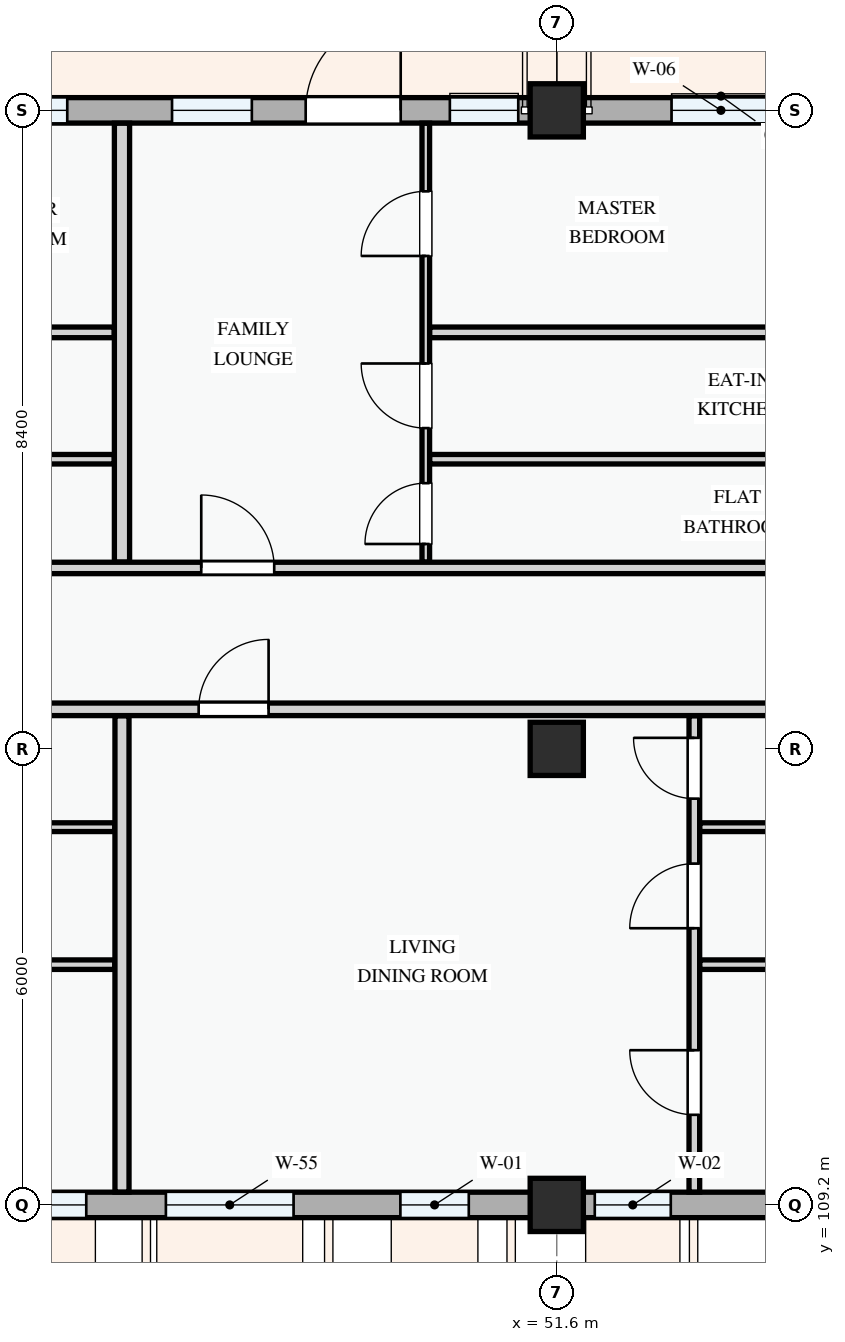
"""IFC4 building model, lengths in metres.
Left out: names, types, materials, properties, quantities, classifications, styles, units other than length and angle.
Written with IfcOpenShell. Run it as: python <this file> out.ifc"""

import sys

from ifc_helpers import new_model, si_unit, direction, frame, frame_2d, origin, origin_2d, place, context, subcontext, project, spatial, rectangle, extrude, element, fill, save


model = new_model("IFC4")
c1 = context("Model", 3, precision=1e-05, world=origin(), true_north=direction((0.0, 1.0)))
c2 = subcontext(c1, "Body", "Model", "MODEL_VIEW")
j1 = project(units=[si_unit("LENGTHUNIT", "METRE"), si_unit("PLANEANGLEUNIT", "RADIAN")], contexts=[c1])
p1 = place(None, origin())
s1 = spatial("IfcSite", under=j1, at=p1, CompositionType="ELEMENT")
p2 = place(p1, origin())
s2 = spatial("IfcBuilding", under=s1, at=p2, CompositionType="ELEMENT")
p3 = place(p2, frame((0.0, 0.0, 18.0)))
s3 = spatial("IfcBuildingStorey", under=s2, at=p3, CompositionType="ELEMENT", Elevation=18.0)
for number, where, z_axis, x_axis in (
    (1, (51.6, 109.2, 0.0), (0.0, 0.0, 1.0), (1.0, 0.0, 0.0)),
    (2, (51.6, 115.2, 0.0), (0.0, 0.0, 1.0), (1.0, 0.0, 0.0)),
    (3, (51.6, 123.6, 0.0), (0.0, 0.0, 1.0), (1.0, 0.0, 0.0)),
):
    element("IfcColumn", number, at=place(p3, frame(where, z_axis=z_axis, x_axis=x_axis)), inside=s3, PredefinedType="COLUMN", context=c2, shape_type="SweptSolid", body=[
        extrude(rectangle(XDim=0.7, YDim=0.7, at=origin_2d()), origin(), (0.0, 0.0, 1.0), 3.3),
    ])
p4 = place(p3, frame((43.2, 109.2, 0.0), z_axis=(0.0, 0.0, 1.0), x_axis=(1.0, 0.0, 0.0)))
e4 = element("IfcWall", 4, at=p4, inside=s3, PredefinedType="STANDARD", context=c2, shape_type="SweptSolid", body=[
    extrude(rectangle(XDim=8.4, YDim=0.335, at=frame_2d((4.2, 0.0))), origin(), (0.0, 0.0, 1.0), 2.375),
])
p5 = place(p4, frame((0.66, 0.0, 0.78)))
e5 = element("IfcOpeningElement", 5, at=p5, cuts=e4, PredefinedType="OPENING", context=c2, shape_type="SweptSolid", body=[
    extrude(rectangle(XDim=1.55, YDim=1.4, at=frame_2d((0.775, 0.7))), frame((0.0, 0.177, 0.0), z_axis=(0.0, -1.0, 0.0), x_axis=(1.0, 0.0, 0.0)), (0.0, 0.0, 1.0), 0.355),
])
p6 = place(p4, frame((3.258, 0.0, 0.78)))
e6 = element("IfcOpeningElement", 6, at=p6, cuts=e4, PredefinedType="OPENING", context=c2, shape_type="SweptSolid", body=[
    extrude(rectangle(XDim=1.68, YDim=1.46, at=frame_2d((0.84, 0.73))), frame((0.0, 0.177, 0.0), z_axis=(0.0, -1.0, 0.0), x_axis=(1.0, 0.0, 0.0)), (0.0, 0.0, 1.0), 0.355),
])
p7 = place(p4, frame((6.343, 0.0, 0.78)))
e7 = element("IfcOpeningElement", 7, at=p7, cuts=e4, PredefinedType="OPENING", context=c2, shape_type="SweptSolid", body=[
    extrude(rectangle(XDim=0.9, YDim=1.2, at=frame_2d((0.45, 0.6))), frame((0.0, 0.177, 0.0), z_axis=(0.0, -1.0, 0.0), x_axis=(1.0, 0.0, 0.0)), (0.0, 0.0, 1.0), 0.355),
])
p8 = place(p3, frame((51.6, 109.2, 0.0), z_axis=(0.0, 0.0, 1.0), x_axis=(1.0, 0.0, 0.0)))
e8 = element("IfcWall", 8, at=p8, inside=s3, PredefinedType="STANDARD", context=c2, shape_type="SweptSolid", body=[
    extrude(rectangle(XDim=6.0, YDim=0.335, at=frame_2d((3.0, 0.0))), origin(), (0.0, 0.0, 1.0), 2.475),
])
p9 = place(p8, frame((0.5, 0.0, 0.78)))
e9 = element("IfcOpeningElement", 9, at=p9, cuts=e8, PredefinedType="OPENING", context=c2, shape_type="SweptSolid", body=[
    extrude(rectangle(XDim=1.0, YDim=1.25, at=frame_2d((0.5, 0.625))), frame((0.0, 0.177, 0.0), z_axis=(0.0, -1.0, 0.0), x_axis=(1.0, 0.0, 0.0)), (0.0, 0.0, 1.0), 0.355),
])
p10 = place(p8, frame((3.36, 0.0, 0.78)))
e10 = element("IfcOpeningElement", 10, at=p10, cuts=e8, PredefinedType="OPENING", context=c2, shape_type="SweptSolid", body=[
    extrude(rectangle(XDim=0.9, YDim=1.2, at=frame_2d((0.45, 0.6))), frame((0.0, 0.177, 0.0), z_axis=(0.0, -1.0, 0.0), x_axis=(1.0, 0.0, 0.0)), (0.0, 0.0, 1.0), 0.355),
])
p11 = place(p3, frame((57.6, 123.6, 0.0), z_axis=(0.0, 0.0, 1.0), x_axis=(-1.0, 0.0, 0.0)))
e11 = element("IfcWall", 11, at=p11, inside=s3, PredefinedType="STANDARD", context=c2, shape_type="SweptSolid", body=[
    extrude(rectangle(XDim=6.0, YDim=0.335, at=frame_2d((3.0, 0.0))), origin(), (0.0, 0.0, 1.0), 2.475),
])
p12 = place(p11, frame((0.62, 0.0, 0.0)))
e12 = element("IfcOpeningElement", 12, at=p12, cuts=e11, PredefinedType="OPENING", context=c2, shape_type="SweptSolid", body=[
    extrude(rectangle(XDim=1.2, YDim=2.15, at=frame_2d((0.6, 1.075))), frame((0.0, 0.177, 0.0), z_axis=(0.0, -1.0, 0.0), x_axis=(1.0, 0.0, 0.0)), (0.0, 0.0, 1.0), 0.355),
])
p13 = place(p11, frame((3.19, 0.0, 0.78)))
e13 = element("IfcOpeningElement", 13, at=p13, cuts=e11, PredefinedType="OPENING", context=c2, shape_type="SweptSolid", body=[
    extrude(rectangle(XDim=1.3, YDim=1.4, at=frame_2d((0.65, 0.7))), frame((0.0, 0.177, 0.0), z_axis=(0.0, -1.0, 0.0), x_axis=(1.0, 0.0, 0.0)), (0.0, 0.0, 1.0), 0.355),
])
p14 = place(p3, frame((51.6, 123.6, 0.0), z_axis=(0.0, 0.0, 1.0), x_axis=(-1.0, 0.0, 0.0)))
e14 = element("IfcWall", 14, at=p14, inside=s3, PredefinedType="STANDARD", context=c2, shape_type="SweptSolid", body=[
    extrude(rectangle(XDim=8.4, YDim=0.335, at=frame_2d((4.2, 0.0))), origin(), (0.0, 0.0, 1.0), 2.375),
])
p15 = place(p14, frame((2.053, 0.0, 0.0)))
e15 = element("IfcOpeningElement", 15, at=p15, cuts=e14, PredefinedType="OPENING", context=c2, shape_type="SweptSolid", body=[
    extrude(rectangle(XDim=1.25, YDim=2.2, at=frame_2d((0.625, 1.1))), frame((0.0, 0.177, 0.0), z_axis=(0.0, -1.0, 0.0), x_axis=(1.0, 0.0, 0.0)), (0.0, 0.0, 1.0), 0.355),
])
p16 = place(p14, frame((0.507, 0.0, 0.78)))
e16 = element("IfcOpeningElement", 16, at=p16, cuts=e14, PredefinedType="OPENING", context=c2, shape_type="SweptSolid", body=[
    extrude(rectangle(XDim=0.9, YDim=1.2, at=frame_2d((0.45, 0.6))), frame((0.0, 0.177, 0.0), z_axis=(0.0, -1.0, 0.0), x_axis=(1.0, 0.0, 0.0)), (0.0, 0.0, 1.0), 0.355),
])
p17 = place(p14, frame((4.012, 0.0, 0.78)))
e17 = element("IfcOpeningElement", 17, at=p17, cuts=e14, PredefinedType="OPENING", context=c2, shape_type="SweptSolid", body=[
    extrude(rectangle(XDim=1.05, YDim=1.2, at=frame_2d((0.525, 0.6))), frame((0.0, 0.177, 0.0), z_axis=(0.0, -1.0, 0.0), x_axis=(1.0, 0.0, 0.0)), (0.0, 0.0, 1.0), 0.355),
])
p18 = place(p14, frame((6.44, 0.0, 0.78)))
e18 = element("IfcOpeningElement", 18, at=p18, cuts=e14, PredefinedType="OPENING", context=c2, shape_type="SweptSolid", body=[
    extrude(rectangle(XDim=1.05, YDim=1.2, at=frame_2d((0.525, 0.6))), frame((0.0, 0.177, 0.0), z_axis=(0.0, -1.0, 0.0), x_axis=(1.0, 0.0, 0.0)), (0.0, 0.0, 1.0), 0.355),
])
p19 = place(p3, frame((40.447, 112.361, 0.0), z_axis=(0.0, 0.0, 1.0), x_axis=(1.0, 0.0, 0.0)))
e19 = element("IfcWall", 19, at=p19, inside=s3, PredefinedType="PARTITIONING", context=c2, shape_type="SweptSolid", body=[
    extrude(rectangle(XDim=5.338, YDim=0.125, at=frame_2d((2.669, 0.0))), origin(), (0.0, 0.0, 1.0), 3.0),
])
p20 = place(p3, frame((40.447, 114.17, 0.0), z_axis=(0.0, 0.0, 1.0), x_axis=(1.0, 0.0, 0.0)))
e20 = element("IfcWall", 20, at=p20, inside=s3, PredefinedType="PARTITIONING", context=c2, shape_type="SweptSolid", body=[
    extrude(rectangle(XDim=5.338, YDim=0.115, at=frame_2d((2.669, 0.0))), origin(), (0.0, 0.0, 1.0), 3.0),
])
p21 = place(p3, frame((40.207, 120.679, 0.0), z_axis=(0.0, 0.0, 1.0), x_axis=(1.0, 0.0, 0.0)))
e21 = element("IfcWall", 21, at=p21, inside=s3, PredefinedType="PARTITIONING", context=c2, shape_type="SweptSolid", body=[
    extrude(rectangle(XDim=5.571, YDim=0.14, at=frame_2d((2.786, 0.0))), origin(), (0.0, 0.0, 1.0), 3.0),
])
p22 = place(p3, frame((40.207, 119.01, 0.0), z_axis=(0.0, 0.0, 1.0), x_axis=(1.0, 0.0, 0.0)))
e22 = element("IfcWall", 22, at=p22, inside=s3, PredefinedType="PARTITIONING", context=c2, shape_type="SweptSolid", body=[
    extrude(rectangle(XDim=5.571, YDim=0.125, at=frame_2d((2.786, 0.0))), origin(), (0.0, 0.0, 1.0), 3.0),
])
p23 = place(p3, frame((53.41, 109.369, 0.0), z_axis=(0.0, 0.0, 1.0), x_axis=(0.0, 1.0, 0.0)))
e23 = element("IfcWall", 23, at=p23, inside=s3, PredefinedType="PARTITIONING", context=c2, shape_type="SweptSolid", body=[
    extrude(rectangle(XDim=6.266, YDim=0.14, at=frame_2d((3.133, 0.0))), origin(), (0.0, 0.0, 1.0), 3.0),
])
p24 = place(p23, frame((1.016, 0.0, 0.0)))
e24 = element("IfcOpeningElement", 24, at=p24, cuts=e23, PredefinedType="OPENING", context=c2, shape_type="SweptSolid", body=[
    extrude(rectangle(XDim=0.85, YDim=2.1, at=frame_2d((0.425, 1.05))), frame((0.0, 0.08, 0.0), z_axis=(0.0, -1.0, 0.0), x_axis=(1.0, 0.0, 0.0)), (0.0, 0.0, 1.0), 0.16),
])
p25 = place(p23, frame((3.471, 0.0, 0.0)))
e25 = element("IfcOpeningElement", 25, at=p25, cuts=e23, PredefinedType="OPENING", context=c2, shape_type="SweptSolid", body=[
    extrude(rectangle(XDim=0.85, YDim=2.1, at=frame_2d((0.425, 1.05))), frame((0.0, 0.08, 0.0), z_axis=(0.0, -1.0, 0.0), x_axis=(1.0, 0.0, 0.0)), (0.0, 0.0, 1.0), 0.16),
])
p26 = place(p23, frame((5.175, 0.0, 0.0)))
e26 = element("IfcOpeningElement", 26, at=p26, cuts=e23, PredefinedType="OPENING", context=c2, shape_type="SweptSolid", body=[
    extrude(rectangle(XDim=0.8, YDim=2.1, at=frame_2d((0.4, 1.05))), frame((0.0, 0.08, 0.0), z_axis=(0.0, -1.0, 0.0), x_axis=(1.0, 0.0, 0.0)), (0.0, 0.0, 1.0), 0.16),
])
p27 = place(p3, frame((53.482, 112.361, 0.0), z_axis=(0.0, 0.0, 1.0), x_axis=(1.0, 0.0, 0.0)))
e27 = element("IfcWall", 27, at=p27, inside=s3, PredefinedType="PARTITIONING", context=c2, shape_type="SweptSolid", body=[
    extrude(rectangle(XDim=3.948, YDim=0.125, at=frame_2d((1.974, 0.0))), origin(), (0.0, 0.0, 1.0), 3.0),
])
p28 = place(p3, frame((53.482, 114.17, 0.0), z_axis=(0.0, 0.0, 1.0), x_axis=(1.0, 0.0, 0.0)))
e28 = element("IfcWall", 28, at=p28, inside=s3, PredefinedType="PARTITIONING", context=c2, shape_type="SweptSolid", body=[
    extrude(rectangle(XDim=3.948, YDim=0.115, at=frame_2d((1.974, 0.0))), origin(), (0.0, 0.0, 1.0), 3.0),
])
p29 = place(p3, frame((49.877, 117.657, 0.0), z_axis=(0.0, 0.0, 1.0), x_axis=(0.0, 1.0, 0.0)))
e29 = element("IfcWall", 29, at=p29, inside=s3, PredefinedType="PARTITIONING", context=c2, shape_type="SweptSolid", body=[
    extrude(rectangle(XDim=5.773, YDim=0.1, at=frame_2d((2.887, 0.0))), origin(), (0.0, 0.0, 1.0), 3.0),
])
p30 = place(p29, frame((0.238, 0.0, 0.0)))
e30 = element("IfcOpeningElement", 30, at=p30, cuts=e29, PredefinedType="OPENING", context=c2, shape_type="SweptSolid", body=[
    extrude(rectangle(XDim=0.8, YDim=2.1, at=frame_2d((0.4, 1.05))), frame((0.0, 0.06, 0.0), z_axis=(0.0, -1.0, 0.0), x_axis=(1.0, 0.0, 0.0)), (0.0, 0.0, 1.0), 0.12),
])
p31 = place(p29, frame((1.763, 0.0, 0.0)))
e31 = element("IfcOpeningElement", 31, at=p31, cuts=e29, PredefinedType="OPENING", context=c2, shape_type="SweptSolid", body=[
    extrude(rectangle(XDim=0.85, YDim=2.1, at=frame_2d((0.425, 1.05))), frame((0.0, 0.06, 0.0), z_axis=(0.0, -1.0, 0.0), x_axis=(1.0, 0.0, 0.0)), (0.0, 0.0, 1.0), 0.12),
])
p32 = place(p29, frame((4.028, 0.0, 0.0)))
e32 = element("IfcOpeningElement", 32, at=p32, cuts=e29, PredefinedType="OPENING", context=c2, shape_type="SweptSolid", body=[
    extrude(rectangle(XDim=0.85, YDim=2.1, at=frame_2d((0.425, 1.05))), frame((0.0, 0.06, 0.0), z_axis=(0.0, -1.0, 0.0), x_axis=(1.0, 0.0, 0.0)), (0.0, 0.0, 1.0), 0.12),
])
p33 = place(p3, frame((49.929, 120.679, 0.0), z_axis=(0.0, 0.0, 1.0), x_axis=(1.0, 0.0, 0.0)))
e33 = element("IfcWall", 33, at=p33, inside=s3, PredefinedType="PARTITIONING", context=c2, shape_type="SweptSolid", body=[
    extrude(rectangle(XDim=7.611, YDim=0.14, at=frame_2d((3.806, 0.0))), origin(), (0.0, 0.0, 1.0), 3.0),
])
p34 = place(p3, frame((49.929, 119.01, 0.0), z_axis=(0.0, 0.0, 1.0), x_axis=(1.0, 0.0, 0.0)))
e34 = element("IfcWall", 34, at=p34, inside=s3, PredefinedType="PARTITIONING", context=c2, shape_type="SweptSolid", body=[
    extrude(rectangle(XDim=7.611, YDim=0.125, at=frame_2d((3.806, 0.0))), origin(), (0.0, 0.0, 1.0), 3.0),
])
p35 = place(p3, frame((45.88, 109.369, 0.0), z_axis=(0.0, 0.0, 1.0), x_axis=(0.0, 1.0, 0.0)))
e35 = element("IfcWall", 35, at=p35, inside=s3, PredefinedType="PARTITIONING", context=c2, shape_type="SweptSolid", body=[
    extrude(rectangle(XDim=6.266, YDim=0.185, at=frame_2d((3.133, 0.0))), origin(), (0.0, 0.0, 1.0), 3.0),
])
p36 = place(p3, frame((45.88, 117.657, 0.0), z_axis=(0.0, 0.0, 1.0), x_axis=(0.0, 1.0, 0.0)))
e36 = element("IfcWall", 36, at=p36, inside=s3, PredefinedType="PARTITIONING", context=c2, shape_type="SweptSolid", body=[
    extrude(rectangle(XDim=5.773, YDim=0.2, at=frame_2d((2.887, 0.0))), origin(), (0.0, 0.0, 1.0), 3.0),
])
p37 = place(p3, frame((25.15, 115.72, 0.0), z_axis=(0.0, 0.0, 1.0), x_axis=(1.0, 0.0, 0.0)))
e37 = element("IfcWall", 37, at=p37, inside=s3, PredefinedType="PARTITIONING", context=c2, shape_type="SweptSolid", body=[
    extrude(rectangle(XDim=32.281, YDim=0.165, at=frame_2d((16.14, 0.0))), origin(), (0.0, 0.0, 1.0), 3.0),
])
p38 = place(p37, frame((0.25, 0.0, 0.0)))
e38 = element("IfcOpeningElement", 38, at=p38, cuts=e37, PredefinedType="OPENING", context=c2, shape_type="SweptSolid", body=[
    extrude(rectangle(XDim=0.96, YDim=2.12, at=frame_2d((0.48, 1.06))), frame((0.0, 0.093, 0.0), z_axis=(0.0, -1.0, 0.0), x_axis=(1.0, 0.0, 0.0)), (0.0, 0.0, 1.0), 0.185),
])
p39 = place(p37, frame((14.015, 0.0, 0.0)))
e39 = element("IfcOpeningElement", 39, at=p39, cuts=e37, PredefinedType="OPENING", context=c2, shape_type="SweptSolid", body=[
    extrude(rectangle(XDim=0.92, YDim=2.1, at=frame_2d((0.46, 1.05))), frame((0.0, 0.093, 0.0), z_axis=(0.0, -1.0, 0.0), x_axis=(1.0, 0.0, 0.0)), (0.0, 0.0, 1.0), 0.185),
])
p40 = place(p37, frame((21.739, 0.0, 0.0)))
e40 = element("IfcOpeningElement", 40, at=p40, cuts=e37, PredefinedType="OPENING", context=c2, shape_type="SweptSolid", body=[
    extrude(rectangle(XDim=0.92, YDim=2.1, at=frame_2d((0.46, 1.05))), frame((0.0, 0.093, 0.0), z_axis=(0.0, -1.0, 0.0), x_axis=(1.0, 0.0, 0.0)), (0.0, 0.0, 1.0), 0.185),
])
p41 = place(p3, frame((22.66, 117.58, 0.0), z_axis=(0.0, 0.0, 1.0), x_axis=(1.0, 0.0, 0.0)))
e41 = element("IfcWall", 41, at=p41, inside=s3, PredefinedType="PARTITIONING", context=c2, shape_type="SweptSolid", body=[
    extrude(rectangle(XDim=34.88, YDim=0.15, at=frame_2d((17.44, 0.0))), origin(), (0.0, 0.0, 1.0), 3.0),
])
p42 = place(p41, frame((2.74, 0.0, 0.0)))
e42 = element("IfcOpeningElement", 42, at=p42, cuts=e41, PredefinedType="OPENING", context=c2, shape_type="SweptSolid", body=[
    extrude(rectangle(XDim=0.92, YDim=2.1, at=frame_2d((0.46, 1.05))), frame((0.0, 0.085, 0.0), z_axis=(0.0, -1.0, 0.0), x_axis=(1.0, 0.0, 0.0)), (0.0, 0.0, 1.0), 0.17),
])
p43 = place(p41, frame((16.285, 0.0, 0.0)))
e43 = element("IfcOpeningElement", 43, at=p43, cuts=e41, PredefinedType="OPENING", context=c2, shape_type="SweptSolid", body=[
    extrude(rectangle(XDim=0.92, YDim=2.1, at=frame_2d((0.46, 1.05))), frame((0.0, 0.085, 0.0), z_axis=(0.0, -1.0, 0.0), x_axis=(1.0, 0.0, 0.0)), (0.0, 0.0, 1.0), 0.17),
])
p44 = place(p41, frame((24.263, 0.0, 0.0)))
e44 = element("IfcOpeningElement", 44, at=p44, cuts=e41, PredefinedType="OPENING", context=c2, shape_type="SweptSolid", body=[
    extrude(rectangle(XDim=0.96, YDim=2.12, at=frame_2d((0.48, 1.06))), frame((0.0, 0.085, 0.0), z_axis=(0.0, -1.0, 0.0), x_axis=(1.0, 0.0, 0.0)), (0.0, 0.0, 1.0), 0.17),
])
p45 = place(p5, origin())
e45 = element("IfcWindow", 45, at=p45, inside=s3, PartitioningType="SINGLE_PANEL", PredefinedType="WINDOW", context=c2, shape_type="SweptSolid", body=[
    extrude(rectangle(XDim=1.55, YDim=1.4, at=frame_2d((0.775, 0.7))), frame((0.0, 0.03, 0.0), z_axis=(0.0, -1.0, 0.0), x_axis=(1.0, 0.0, 0.0)), (0.0, 0.0, 1.0), 0.06),
])
fill(e5, e45)
p46 = place(p6, origin())
e46 = element("IfcWindow", 46, at=p46, inside=s3, PartitioningType="DOUBLE_PANEL_VERTICAL", PredefinedType="WINDOW", context=c2, shape_type="SweptSolid", body=[
    extrude(rectangle(XDim=1.68, YDim=1.46, at=frame_2d((0.84, 0.73))), frame((0.0, 0.03, 0.0), z_axis=(0.0, -1.0, 0.0), x_axis=(1.0, 0.0, 0.0)), (0.0, 0.0, 1.0), 0.06),
])
fill(e6, e46)
p47 = place(p7, origin())
e47 = element("IfcWindow", 47, at=p47, inside=s3, PartitioningType="SINGLE_PANEL", PredefinedType="WINDOW", context=c2, shape_type="SweptSolid", body=[
    extrude(rectangle(XDim=0.9, YDim=1.2, at=frame_2d((0.45, 0.6))), frame((0.0, 0.03, 0.0), z_axis=(0.0, -1.0, 0.0), x_axis=(1.0, 0.0, 0.0)), (0.0, 0.0, 1.0), 0.06),
])
fill(e7, e47)
p48 = place(p9, origin())
e48 = element("IfcWindow", 48, at=p48, inside=s3, PartitioningType="SINGLE_PANEL", PredefinedType="WINDOW", context=c2, shape_type="SweptSolid", body=[
    extrude(rectangle(XDim=1.0, YDim=1.25, at=frame_2d((0.5, 0.625))), frame((0.0, 0.03, 0.0), z_axis=(0.0, -1.0, 0.0), x_axis=(1.0, 0.0, 0.0)), (0.0, 0.0, 1.0), 0.06),
])
fill(e9, e48)
p49 = place(p13, origin())
e49 = element("IfcWindow", 49, at=p49, inside=s3, PartitioningType="SINGLE_PANEL", PredefinedType="WINDOW", context=c2, shape_type="SweptSolid", body=[
    extrude(rectangle(XDim=1.3, YDim=1.4, at=frame_2d((0.65, 0.7))), frame((0.0, 0.03, 0.0), z_axis=(0.0, -1.0, 0.0), x_axis=(1.0, 0.0, 0.0)), (0.0, 0.0, 1.0), 0.06),
])
fill(e13, e49)
p50 = place(p15, frame((1.25, 0.0, 0.0), z_axis=(0.0, 0.0, 1.0), x_axis=(-1.0, 0.0, 0.0)))
e50 = element("IfcDoor", 50, at=p50, inside=s3, OperationType="SINGLE_SWING_RIGHT", PredefinedType="DOOR", context=c2, shape_type="SweptSolid", body=[
    extrude(rectangle(XDim=1.25, YDim=2.2, at=frame_2d((0.625, 1.1))), frame((0.0, 0.025, 0.0), z_axis=(0.0, -1.0, 0.0), x_axis=(1.0, 0.0, 0.0)), (0.0, 0.0, 1.0), 0.05),
])
fill(e15, e50)
p51 = place(p16, origin())
e51 = element("IfcWindow", 51, at=p51, inside=s3, PartitioningType="SINGLE_PANEL", PredefinedType="WINDOW", context=c2, shape_type="SweptSolid", body=[
    extrude(rectangle(XDim=0.9, YDim=1.2, at=frame_2d((0.45, 0.6))), frame((0.0, 0.03, 0.0), z_axis=(0.0, -1.0, 0.0), x_axis=(1.0, 0.0, 0.0)), (0.0, 0.0, 1.0), 0.06),
])
fill(e16, e51)
p52 = place(p17, origin())
e52 = element("IfcWindow", 52, at=p52, inside=s3, PartitioningType="SINGLE_PANEL", PredefinedType="WINDOW", context=c2, shape_type="SweptSolid", body=[
    extrude(rectangle(XDim=1.05, YDim=1.2, at=frame_2d((0.525, 0.6))), frame((0.0, 0.03, 0.0), z_axis=(0.0, -1.0, 0.0), x_axis=(1.0, 0.0, 0.0)), (0.0, 0.0, 1.0), 0.06),
])
fill(e17, e52)
p53 = place(p18, origin())
e53 = element("IfcWindow", 53, at=p53, inside=s3, PartitioningType="SINGLE_PANEL", PredefinedType="WINDOW", context=c2, shape_type="SweptSolid", body=[
    extrude(rectangle(XDim=1.05, YDim=1.2, at=frame_2d((0.525, 0.6))), frame((0.0, 0.03, 0.0), z_axis=(0.0, -1.0, 0.0), x_axis=(1.0, 0.0, 0.0)), (0.0, 0.0, 1.0), 0.06),
])
fill(e18, e53)
p54 = place(p24, origin())
e54 = element("IfcDoor", 54, at=p54, inside=s3, OperationType="SINGLE_SWING_RIGHT", PredefinedType="DOOR", context=c2, shape_type="SweptSolid", body=[
    extrude(rectangle(XDim=0.85, YDim=2.1, at=frame_2d((0.425, 1.05))), frame((0.0, 0.025, 0.0), z_axis=(0.0, -1.0, 0.0), x_axis=(1.0, 0.0, 0.0)), (0.0, 0.0, 1.0), 0.05),
])
fill(e24, e54)
p55 = place(p25, origin())
e55 = element("IfcDoor", 55, at=p55, inside=s3, OperationType="SINGLE_SWING_LEFT", PredefinedType="DOOR", context=c2, shape_type="SweptSolid", body=[
    extrude(rectangle(XDim=0.85, YDim=2.1, at=frame_2d((0.425, 1.05))), frame((0.0, 0.025, 0.0), z_axis=(0.0, -1.0, 0.0), x_axis=(1.0, 0.0, 0.0)), (0.0, 0.0, 1.0), 0.05),
])
fill(e25, e55)
p56 = place(p26, origin())
e56 = element("IfcDoor", 56, at=p56, inside=s3, OperationType="SINGLE_SWING_RIGHT", PredefinedType="DOOR", context=c2, shape_type="SweptSolid", body=[
    extrude(rectangle(XDim=0.8, YDim=2.1, at=frame_2d((0.4, 1.05))), frame((0.0, 0.025, 0.0), z_axis=(0.0, -1.0, 0.0), x_axis=(1.0, 0.0, 0.0)), (0.0, 0.0, 1.0), 0.05),
])
fill(e26, e56)
p57 = place(p30, origin())
e57 = element("IfcDoor", 57, at=p57, inside=s3, OperationType="SINGLE_SWING_LEFT", PredefinedType="DOOR", context=c2, shape_type="SweptSolid", body=[
    extrude(rectangle(XDim=0.8, YDim=2.1, at=frame_2d((0.4, 1.05))), frame((0.0, 0.025, 0.0), z_axis=(0.0, -1.0, 0.0), x_axis=(1.0, 0.0, 0.0)), (0.0, 0.0, 1.0), 0.05),
])
fill(e30, e57)
p58 = place(p31, origin())
e58 = element("IfcDoor", 58, at=p58, inside=s3, OperationType="SINGLE_SWING_RIGHT", PredefinedType="DOOR", context=c2, shape_type="SweptSolid", body=[
    extrude(rectangle(XDim=0.85, YDim=2.1, at=frame_2d((0.425, 1.05))), frame((0.0, 0.025, 0.0), z_axis=(0.0, -1.0, 0.0), x_axis=(1.0, 0.0, 0.0)), (0.0, 0.0, 1.0), 0.05),
])
fill(e31, e58)
p59 = place(p32, origin())
e59 = element("IfcDoor", 59, at=p59, inside=s3, OperationType="SINGLE_SWING_LEFT", PredefinedType="DOOR", context=c2, shape_type="SweptSolid", body=[
    extrude(rectangle(XDim=0.85, YDim=2.1, at=frame_2d((0.425, 1.05))), frame((0.0, 0.025, 0.0), z_axis=(0.0, -1.0, 0.0), x_axis=(1.0, 0.0, 0.0)), (0.0, 0.0, 1.0), 0.05),
])
fill(e32, e59)
p60 = place(p40, origin())
e60 = element("IfcDoor", 60, at=p60, inside=s3, OperationType="SINGLE_SWING_RIGHT", PredefinedType="DOOR", context=c2, shape_type="SweptSolid", body=[
    extrude(rectangle(XDim=0.92, YDim=2.1, at=frame_2d((0.46, 1.05))), frame((0.0, 0.025, 0.0), z_axis=(0.0, -1.0, 0.0), x_axis=(1.0, 0.0, 0.0)), (0.0, 0.0, 1.0), 0.05),
])
fill(e40, e60)
p61 = place(p44, origin())
e61 = element("IfcDoor", 61, at=p61, inside=s3, OperationType="SINGLE_SWING_LEFT", PredefinedType="DOOR", context=c2, shape_type="SweptSolid", body=[
    extrude(rectangle(XDim=0.96, YDim=2.12, at=frame_2d((0.48, 1.06))), frame((0.0, 0.025, 0.0), z_axis=(0.0, -1.0, 0.0), x_axis=(1.0, 0.0, 0.0)), (0.0, 0.0, 1.0), 0.05),
])
fill(e44, e61)
save(model, sys.argv[1])
